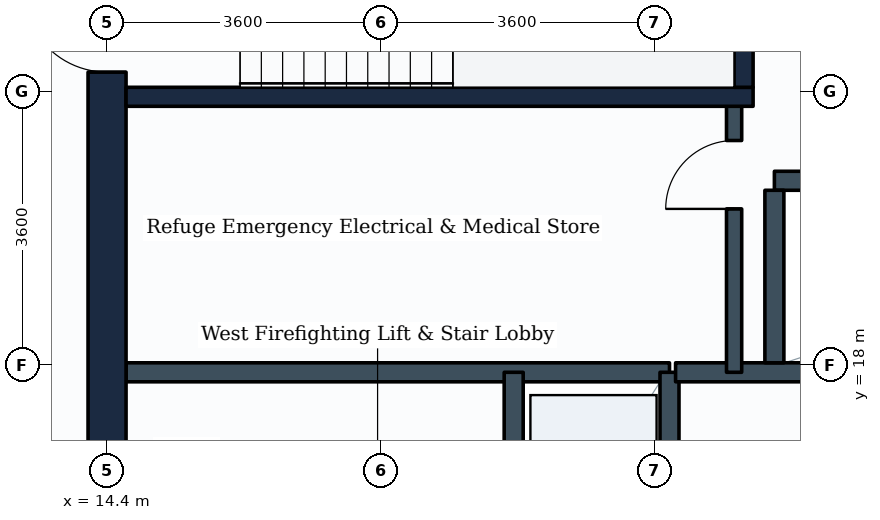
"""IFC4 building model, lengths in metres.
Left out: names, types, materials, properties, quantities, classifications, styles, units other than length and angle.
Written with IfcOpenShell. Run it as: python <this file> out.ifc"""

import sys

from ifc_helpers import new_model, si_unit, direction, frame, frame_2d, origin, place, context, subcontext, project, spatial, rectangle, extrude, element, fill, save


model = new_model("IFC4")
c1 = context("Model", 3, precision=1e-05, world=origin(), true_north=direction((0.0, 1.0)))
c2 = subcontext(c1, "Body", "Model", "MODEL_VIEW")
j1 = project(units=[si_unit("LENGTHUNIT", "METRE"), si_unit("PLANEANGLEUNIT", "RADIAN")], contexts=[c1])
p1 = place(None, origin())
s1 = spatial("IfcSite", under=j1, at=p1, CompositionType="ELEMENT")
p2 = place(p1, origin())
s2 = spatial("IfcBuilding", under=s1, at=p2, CompositionType="ELEMENT")
p3 = place(p2, frame((0.0, 0.0, 213.8)))
s3 = spatial("IfcBuildingStorey", under=s2, at=p3, CompositionType="ELEMENT", Elevation=213.8)
p4 = place(p3, frame((14.4, 10.8, 0.0), z_axis=(0.0, 0.0, 1.0), x_axis=(0.0, 1.0, 0.0)))
e1 = element("IfcWall", 1, at=p4, inside=s3, PredefinedType="SHEAR", context=c2, shape_type="SweptSolid", body=[
    extrude(rectangle(XDim=14.4, YDim=0.5, at=frame_2d((7.2, 0.0))), origin(), (0.0, 0.0, 1.0), 3.35),
])
p5 = place(p4, frame((11.05, 0.0, 0.0)))
e2 = element("IfcOpeningElement", 2, at=p5, cuts=e1, PredefinedType="OPENING", context=c2, shape_type="SweptSolid", body=[
    extrude(rectangle(XDim=1.1, YDim=2.1, at=frame_2d((0.55, 1.05))), frame((0.0, 0.26, 0.0), z_axis=(0.0, -1.0, 0.0), x_axis=(1.0, 0.0, 0.0)), (0.0, 0.0, 1.0), 0.52),
])
p6 = place(p4, frame((4.9, 0.0, 0.0)))
e3 = element("IfcOpeningElement", 3, at=p6, cuts=e1, PredefinedType="OPENING", context=c2, shape_type="SweptSolid", body=[
    extrude(rectangle(XDim=1.2, YDim=2.1, at=frame_2d((0.6, 1.05))), frame((0.0, 0.26, 0.0), z_axis=(0.0, -1.0, 0.0), x_axis=(1.0, 0.0, 0.0)), (0.0, 0.0, 1.0), 0.52),
])
p7 = place(p3, frame((14.65, 21.525, 0.0), z_axis=(0.0, 0.0, 1.0), x_axis=(1.0, 0.0, 0.0)))
e4 = element("IfcWall", 4, at=p7, inside=s3, PredefinedType="SHEAR", context=c2, shape_type="SweptSolid", body=[
    extrude(rectangle(XDim=8.25, YDim=0.25, at=frame_2d((4.125, 0.0))), origin(), (0.0, 0.0, 1.0), 3.35),
])
p8 = place(p3, frame((22.775, 21.65, 0.0), z_axis=(0.0, 0.0, 1.0), x_axis=(0.0, 1.0, 0.0)))
e5 = element("IfcWall", 5, at=p8, inside=s3, PredefinedType="SHEAR", context=c2, shape_type="SweptSolid", body=[
    extrude(rectangle(XDim=2.84, YDim=0.25, at=frame_2d((1.42, 0.0))), origin(), (0.0, 0.0, 1.0), 3.35),
])
p9 = place(p3, frame((14.65, 17.9, 0.0), z_axis=(0.0, 0.0, 1.0), x_axis=(1.0, 0.0, 0.0)))
e6 = element("IfcWall", 6, at=p9, inside=s3, PredefinedType="PARTITIONING", context=c2, shape_type="SweptSolid", body=[
    extrude(rectangle(XDim=7.15, YDim=0.25, at=frame_2d((3.575, 0.0))), origin(), (0.0, 0.0, 1.0), 3.335),
])
p10 = place(p3, frame((19.75, 14.84, 0.0), z_axis=(0.0, 0.0, 1.0), x_axis=(0.0, 1.0, 0.0)))
e7 = element("IfcWall", 7, at=p10, inside=s3, PredefinedType="PARTITIONING", context=c2, shape_type="SweptSolid", body=[
    extrude(rectangle(XDim=3.06, YDim=0.25, at=frame_2d((1.53, 0.0))), origin(), (0.0, 0.0, 1.0), 3.335),
])
p11 = place(p10, frame((0.98, 0.0, 0.0)))
e8 = element("IfcOpeningElement", 8, at=p11, cuts=e7, PredefinedType="OPENING", context=c2, shape_type="SweptSolid", body=[
    extrude(rectangle(XDim=1.1, YDim=2.1, at=frame_2d((0.55, 1.05))), frame((0.0, 0.135, 0.0), z_axis=(0.0, -1.0, 0.0), x_axis=(1.0, 0.0, 0.0)), (0.0, 0.0, 1.0), 0.27),
])
p12 = place(p3, frame((21.8, 14.84, 0.0), z_axis=(0.0, 0.0, 1.0), x_axis=(0.0, 1.0, 0.0)))
e9 = element("IfcWall", 9, at=p12, inside=s3, PredefinedType="PARTITIONING", context=c2, shape_type="SweptSolid", body=[
    extrude(rectangle(XDim=3.06, YDim=0.25, at=frame_2d((1.53, 0.0))), origin(), (0.0, 0.0, 1.0), 3.335),
])
p13 = place(p3, frame((21.88, 17.9, 0.0), z_axis=(0.0, 0.0, 1.0), x_axis=(1.0, 0.0, 0.0)))
e10 = element("IfcWall", 10, at=p13, inside=s3, PredefinedType="PARTITIONING", context=c2, shape_type="SweptSolid", body=[
    extrude(rectangle(XDim=8.52, YDim=0.25, at=frame_2d((4.26, 0.0))), origin(), (0.0, 0.0, 1.0), 3.335),
])
p14 = place(p3, frame((23.18, 20.42, 0.0), z_axis=(0.0, 0.0, 1.0), x_axis=(1.0, 0.0, 0.0)))
e11 = element("IfcWall", 11, at=p14, inside=s3, PredefinedType="PARTITIONING", context=c2, shape_type="SweptSolid", body=[
    extrude(rectangle(XDim=7.22, YDim=0.25, at=frame_2d((3.61, 0.0))), origin(), (0.0, 0.0, 1.0), 3.335),
])
p15 = place(p3, frame((23.18, 18.025, 0.0), z_axis=(0.0, 0.0, 1.0), x_axis=(0.0, 1.0, 0.0)))
e12 = element("IfcWall", 12, at=p15, inside=s3, PredefinedType="PARTITIONING", context=c2, shape_type="SweptSolid", body=[
    extrude(rectangle(XDim=2.27, YDim=0.25, at=frame_2d((1.135, 0.0))), origin(), (0.0, 0.0, 1.0), 3.335),
])
p16 = place(p3, frame((22.65, 17.9, 0.0), z_axis=(0.0, 0.0, 1.0), x_axis=(0.0, 1.0, 0.0)))
e13 = element("IfcWall", 13, at=p16, inside=s3, PredefinedType="PARTITIONING", context=c2, shape_type="SweptSolid", body=[
    extrude(rectangle(XDim=3.625, YDim=0.2, at=frame_2d((1.812, 0.0))), origin(), (0.0, 0.0, 1.0), 3.335),
])
p17 = place(p16, frame((2.15, 0.0, 0.0)))
e14 = element("IfcOpeningElement", 14, at=p17, cuts=e13, PredefinedType="OPENING", context=c2, shape_type="SweptSolid", body=[
    extrude(rectangle(XDim=0.9, YDim=2.1, at=frame_2d((0.45, 1.05))), frame((0.0, 0.11, 0.0), z_axis=(0.0, -1.0, 0.0), x_axis=(1.0, 0.0, 0.0)), (0.0, 0.0, 1.0), 0.22),
])
p18 = place(p5, origin())
e15 = element("IfcDoor", 15, at=p18, inside=s3, OperationType="SINGLE_SWING_RIGHT", PredefinedType="DOOR", context=c2, shape_type="SweptSolid", body=[
    extrude(rectangle(XDim=1.1, YDim=2.1, at=frame_2d((0.55, 1.05))), frame((0.0, 0.025, 0.0), z_axis=(0.0, -1.0, 0.0), x_axis=(1.0, 0.0, 0.0)), (0.0, 0.0, 1.0), 0.05),
])
fill(e2, e15)
p19 = place(p17, origin())
e16 = element("IfcDoor", 16, at=p19, inside=s3, OperationType="SINGLE_SWING_LEFT", PredefinedType="DOOR", context=c2, shape_type="SweptSolid", body=[
    extrude(rectangle(XDim=0.9, YDim=2.1, at=frame_2d((0.45, 1.05))), frame((0.0, 0.025, 0.0), z_axis=(0.0, -1.0, 0.0), x_axis=(1.0, 0.0, 0.0)), (0.0, 0.0, 1.0), 0.05),
])
fill(e14, e16)
save(model, sys.argv[1])
